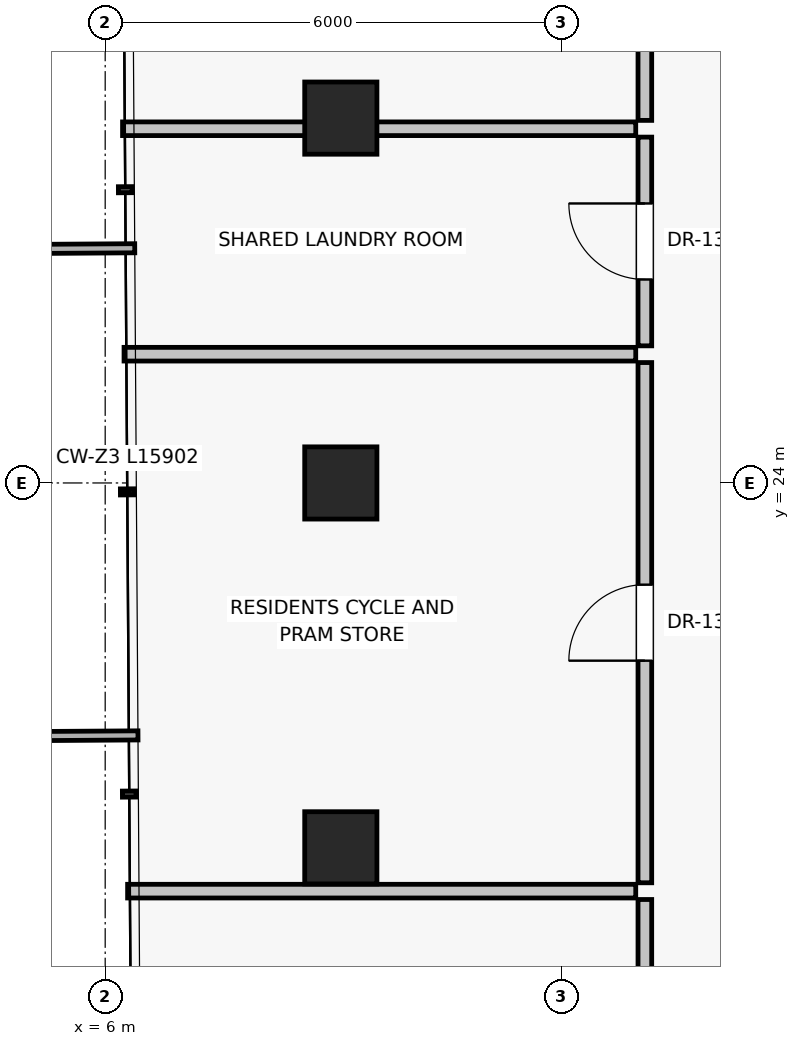
"""IFC4 building model, lengths in metres.
Left out: names, types, materials, properties, quantities, classifications, styles, units other than length and angle.
Written with IfcOpenShell. Run it as: python <this file> out.ifc"""

import sys

from ifc_helpers import new_model, si_unit, direction, frame, frame_2d, origin, origin_2d, place, context, subcontext, project, spatial, rectangle, extrude, source, transform, mapped, element, fill, save


model = new_model("IFC4")
c1 = context("Model", 3, precision=1e-05, world=origin(), true_north=direction((0.0, 1.0)))
c2 = subcontext(c1, "Body", "Model", "MODEL_VIEW")
j1 = project(units=[si_unit("LENGTHUNIT", "METRE"), si_unit("PLANEANGLEUNIT", "RADIAN")], contexts=[c1])
p1 = place(None, origin())
s1 = spatial("IfcSite", under=j1, at=p1, CompositionType="ELEMENT")
p2 = place(p1, origin())
s2 = spatial("IfcBuilding", under=s1, at=p2, CompositionType="ELEMENT")
p3 = place(p2, frame((0.0, 0.0, 204.85)))
s3 = spatial("IfcBuildingStorey", under=s2, at=p3, CompositionType="ELEMENT", Elevation=204.85)
for number, where, z_axis, x_axis in (
    (1, (9.1, 28.8, 0.0), (0.0, 0.0, 1.0), (1.0, 0.0, 0.0)),
    (2, (9.1, 24.0, 0.0), (0.0, 0.0, 1.0), (1.0, 0.0, 0.0)),
    (3, (9.1, 19.2, 0.0), (0.0, 0.0, 1.0), (1.0, 0.0, 0.0)),
):
    element("IfcColumn", number, at=place(p3, frame(where, z_axis=z_axis, x_axis=x_axis)), inside=s3, PredefinedType="COLUMN", context=c2, shape_type="SweptSolid", body=[
        extrude(rectangle(XDim=0.95, YDim=0.95, at=origin_2d()), origin(), (0.0, 0.0, 1.0), 3.25),
    ])
p4 = place(p3, frame((13.1, 14.41, 0.0), z_axis=(0.0, 0.0, 1.0), x_axis=(0.0, 1.0, 0.0)))
e4 = element("IfcWall", 4, at=p4, inside=s3, PredefinedType="PARTITIONING", context=c2, shape_type="SweptSolid", body=[
    extrude(rectangle(XDim=4.11, YDim=0.18, at=frame_2d((2.055, 0.0))), origin(), (0.0, 0.0, 1.0), 2.662),
])
p5 = place(p4, frame((1.555, 0.0, 0.0)))
e5 = element("IfcOpeningElement", 5, at=p5, cuts=e4, PredefinedType="OPENING", context=c2, shape_type="SweptSolid", body=[
    extrude(rectangle(XDim=1.0, YDim=2.01, at=frame_2d((0.5, 1.005))), frame((0.0, 0.1, 0.0), z_axis=(0.0, -1.0, 0.0), x_axis=(1.0, 0.0, 0.0)), (0.0, 0.0, 1.0), 0.2),
])
p6 = place(p3, frame((13.1, 18.74, 0.0), z_axis=(0.0, 0.0, 1.0), x_axis=(0.0, 1.0, 0.0)))
e6 = element("IfcWall", 6, at=p6, inside=s3, PredefinedType="PARTITIONING", context=c2, shape_type="SweptSolid", body=[
    extrude(rectangle(XDim=6.844, YDim=0.18, at=frame_2d((3.422, 0.0))), origin(), (0.0, 0.0, 1.0), 2.662),
])
p7 = place(p6, frame((2.922, 0.0, 0.0)))
e7 = element("IfcOpeningElement", 7, at=p7, cuts=e6, PredefinedType="OPENING", context=c2, shape_type="SweptSolid", body=[
    extrude(rectangle(XDim=1.0, YDim=2.01, at=frame_2d((0.5, 1.005))), frame((0.0, 0.1, 0.0), z_axis=(0.0, -1.0, 0.0), x_axis=(1.0, 0.0, 0.0)), (0.0, 0.0, 1.0), 0.2),
])
p8 = place(p3, frame((12.98, 18.63, 0.0), z_axis=(0.0, 0.0, 1.0), x_axis=(-1.0, 0.0, 0.0)))
e8 = element("IfcWall", 8, at=p8, inside=s3, PredefinedType="PARTITIONING", context=c2, shape_type="SweptSolid", body=[
    extrude(rectangle(XDim=6.685, YDim=0.18, at=frame_2d((3.343, 0.0))), origin(), (0.0, 0.0, 1.0), 2.469),
])
p9 = place(p3, frame((12.98, 25.694, 0.0), z_axis=(0.0, 0.0, 1.0), x_axis=(-1.0, 0.0, 0.0)))
e9 = element("IfcWall", 9, at=p9, inside=s3, PredefinedType="PARTITIONING", context=c2, shape_type="SweptSolid", body=[
    extrude(rectangle(XDim=6.732, YDim=0.18, at=frame_2d((3.366, 0.0))), origin(), (0.0, 0.0, 1.0), 3.015),
])
p10 = place(p3, frame((13.1, 25.804, 0.0), z_axis=(0.0, 0.0, 1.0), x_axis=(0.0, 1.0, 0.0)))
e10 = element("IfcWall", 10, at=p10, inside=s3, PredefinedType="PARTITIONING", context=c2, shape_type="SweptSolid", body=[
    extrude(rectangle(XDim=2.746, YDim=0.18, at=frame_2d((1.373, 0.0))), origin(), (0.0, 0.0, 1.0), 2.662),
])
p11 = place(p10, frame((0.873, 0.0, 0.0)))
e11 = element("IfcOpeningElement", 11, at=p11, cuts=e10, PredefinedType="OPENING", context=c2, shape_type="SweptSolid", body=[
    extrude(rectangle(XDim=1.0, YDim=2.01, at=frame_2d((0.5, 1.005))), frame((0.0, 0.1, 0.0), z_axis=(0.0, -1.0, 0.0), x_axis=(1.0, 0.0, 0.0)), (0.0, 0.0, 1.0), 0.2),
])
p12 = place(p3, frame((13.1, 28.77, 0.0), z_axis=(0.0, 0.0, 1.0), x_axis=(0.0, 1.0, 0.0)))
e12 = element("IfcWall", 12, at=p12, inside=s3, PredefinedType="PARTITIONING", context=c2, shape_type="SweptSolid", body=[
    extrude(rectangle(XDim=4.62, YDim=0.18, at=frame_2d((2.31, 0.0))), origin(), (0.0, 0.0, 1.0), 2.662),
])
p13 = place(p12, frame((1.81, 0.0, 0.0)))
e13 = element("IfcOpeningElement", 13, at=p13, cuts=e12, PredefinedType="OPENING", context=c2, shape_type="SweptSolid", body=[
    extrude(rectangle(XDim=1.0, YDim=2.01, at=frame_2d((0.5, 1.005))), frame((0.0, 0.1, 0.0), z_axis=(0.0, -1.0, 0.0), x_axis=(1.0, 0.0, 0.0)), (0.0, 0.0, 1.0), 0.2),
])
p14 = place(p3, frame((12.98, 28.66, 0.0), z_axis=(0.0, 0.0, 1.0), x_axis=(-1.0, 0.0, 0.0)))
e14 = element("IfcWall", 14, at=p14, inside=s3, PredefinedType="PARTITIONING", context=c2, shape_type="SweptSolid", body=[
    extrude(rectangle(XDim=6.751, YDim=0.18, at=frame_2d((3.376, 0.0))), origin(), (0.0, 0.0, 1.0), 2.469),
])
m1 = source(origin(), c2, "Body", "SweptSolid", [
    extrude(rectangle(XDim=1.0, YDim=2.01, at=frame_2d((0.5, 1.005))), frame((0.0, 0.025, 0.0), z_axis=(0.0, -1.0, 0.0), x_axis=(1.0, 0.0, 0.0)), (0.0, 0.0, 1.0), 0.05),
])
p15 = place(p7, origin())
e15 = element("IfcDoor", 15, at=p15, inside=s3, OperationType="SINGLE_SWING_LEFT", PredefinedType="DOOR", context=c2, shape_type="MappedRepresentation", body=[
    mapped(m1, transform((0.0, 0.0, 0.0), scale=1.0)),
])
fill(e7, e15)
p16 = place(p11, origin())
e16 = element("IfcDoor", 16, at=p16, inside=s3, OperationType="SINGLE_SWING_RIGHT", PredefinedType="DOOR", context=c2, shape_type="MappedRepresentation", body=[
    mapped(m1, transform((0.0, 0.0, 0.0), scale=1.0)),
])
fill(e11, e16)
save(model, sys.argv[1])
